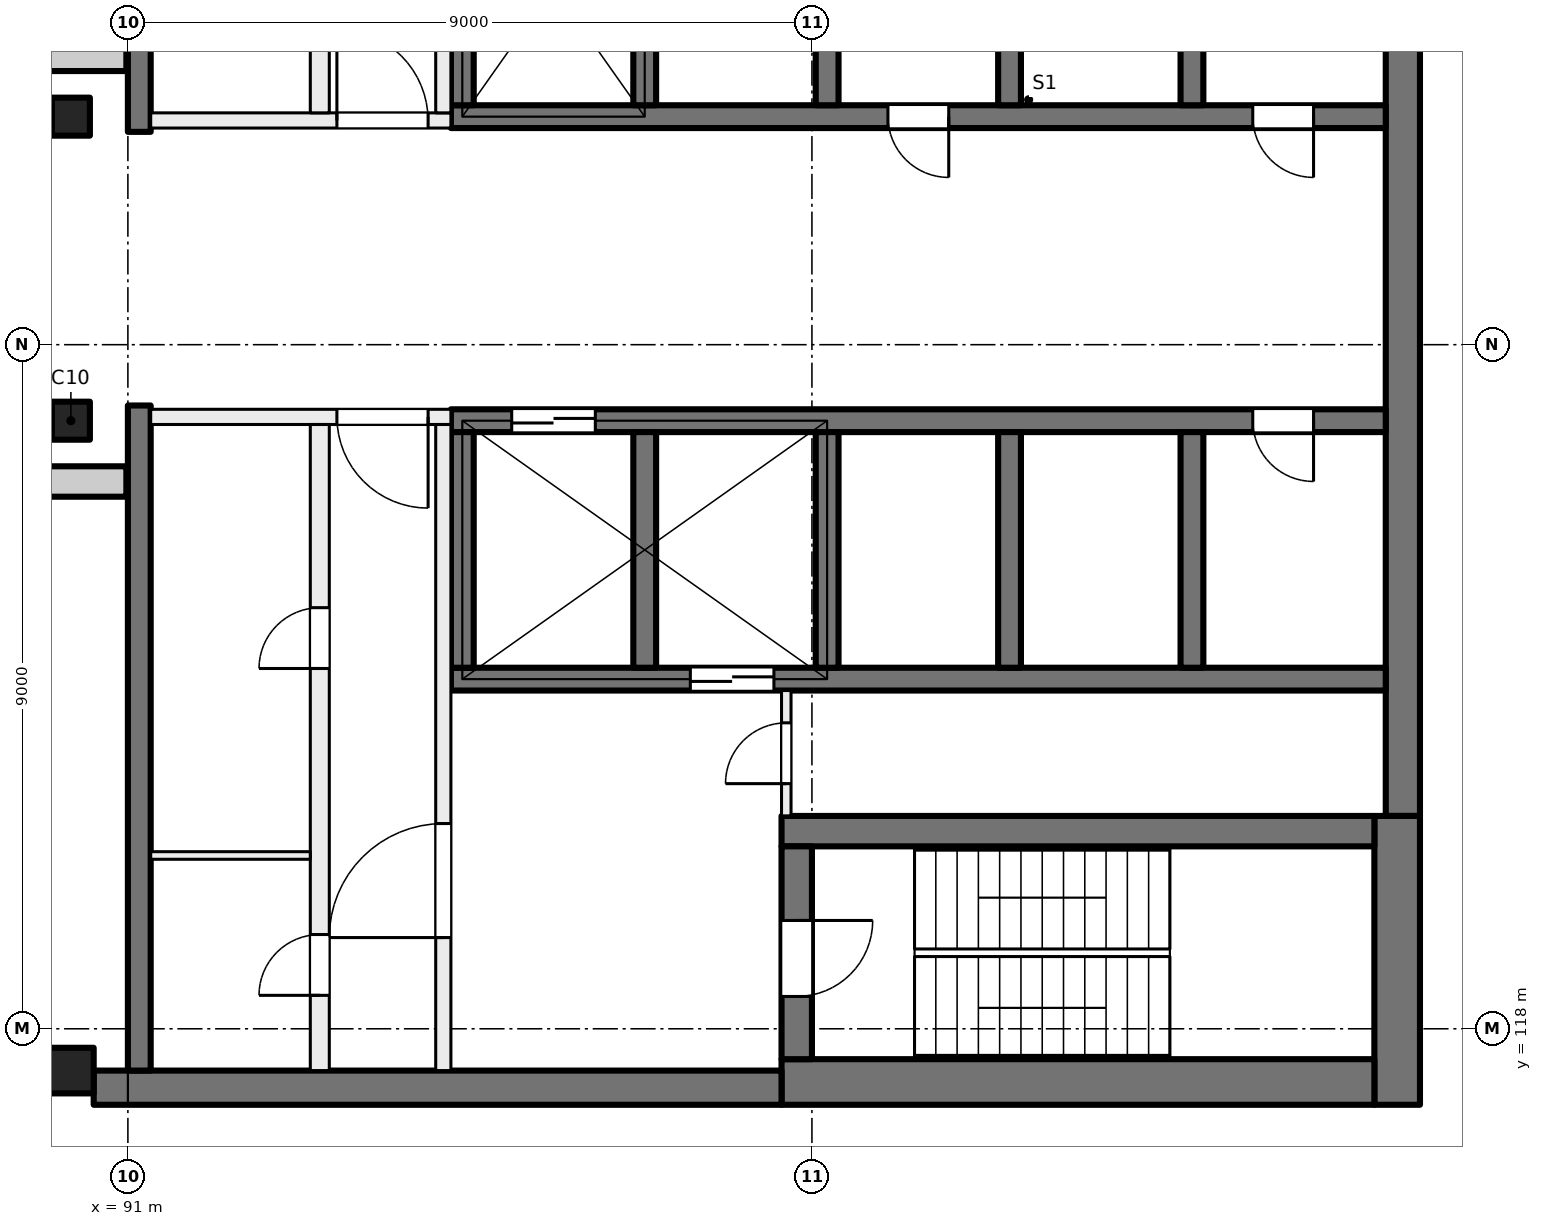
"""IFC4 building model, lengths in metres.
Left out: names, types, materials, properties, quantities, classifications, styles, units other than length and angle.
Written with IfcOpenShell. Run it as: python <this file> out.ifc"""

import sys

from ifc_helpers import new_model, si_unit, direction, frame, frame_2d, origin, origin_2d, place, context, subcontext, project, spatial, rectangle, extrude, element, fill, save


model = new_model("IFC4")
c1 = context("Model", 3, precision=1e-05, world=origin(), true_north=direction((0.0, 1.0)))
c2 = subcontext(c1, "Body", "Model", "MODEL_VIEW")
j1 = project(units=[si_unit("LENGTHUNIT", "METRE"), si_unit("PLANEANGLEUNIT", "RADIAN")], contexts=[c1])
p1 = place(None, origin())
s1 = spatial("IfcSite", under=j1, at=p1, CompositionType="ELEMENT")
p2 = place(p1, origin())
s2 = spatial("IfcBuilding", under=s1, at=p2, CompositionType="ELEMENT")
p3 = place(p2, frame((0.0, 0.0, 286.5)))
s3 = spatial("IfcBuildingStorey", under=s2, at=p3, CompositionType="ELEMENT", Elevation=286.5)
for number, where, z_axis, x_axis in (
    (1, (90.25, 130.0, 0.0), (0.0, 0.0, 1.0), (1.0, 0.0, 0.0)),
    (2, (90.25, 126.0, 0.0), (0.0, 0.0, 1.0), (1.0, 0.0, 0.0)),
):
    element("IfcColumn", number, at=place(p3, frame(where, z_axis=z_axis, x_axis=x_axis)), inside=s3, PredefinedType="COLUMN", context=c2, shape_type="SweptSolid", body=[
        extrude(rectangle(XDim=0.5, YDim=0.5, at=origin_2d()), origin(), (0.0, 0.0, 1.0), 4.5),
    ])
p4 = place(p3, frame((90.25, 117.45, 0.0), z_axis=(0.0, 0.0, 1.0), x_axis=(1.0, 0.0, 0.0)))
e3 = element("IfcColumn", 3, at=p4, inside=s3, PredefinedType="COLUMN", context=c2, shape_type="SweptSolid", body=[
    extrude(rectangle(XDim=0.6, YDim=0.6, at=origin_2d()), origin(), (0.0, 0.0, 1.0), 4.5),
])
p5 = place(p3, frame((107.775, 135.2, 0.0), z_axis=(0.0, 0.0, 1.0), x_axis=(0.0, -1.0, 0.0)))
e4 = element("IfcWall", 4, at=p5, inside=s3, PredefinedType="SHEAR", context=c2, shape_type="SweptSolid", body=[
    extrude(rectangle(XDim=14.4, YDim=0.45, at=frame_2d((7.2, 0.0))), origin(), (0.0, 0.0, 1.0), 4.5),
])
p6 = place(p3, frame((107.7, 120.8, 0.0), z_axis=(0.0, 0.0, 1.0), x_axis=(0.0, -1.0, 0.0)))
e5 = element("IfcWall", 5, at=p6, inside=s3, PredefinedType="SHEAR", context=c2, shape_type="SweptSolid", body=[
    extrude(rectangle(XDim=3.8, YDim=0.6, at=frame_2d((1.9, 0.0))), origin(), (0.0, 0.0, 1.0), 4.5),
])
p7 = place(p3, frame((107.4, 117.3, 0.0), z_axis=(0.0, 0.0, 1.0), x_axis=(-1.0, 0.0, 0.0)))
e6 = element("IfcWall", 6, at=p7, inside=s3, PredefinedType="SHEAR", context=c2, shape_type="SweptSolid", body=[
    extrude(rectangle(XDim=7.8, YDim=0.6, at=frame_2d((3.9, 0.0))), origin(), (0.0, 0.0, 1.0), 4.5),
])
p8 = place(p3, frame((99.6, 117.225, 0.0), z_axis=(0.0, 0.0, 1.0), x_axis=(-1.0, 0.0, 0.0)))
e7 = element("IfcWall", 7, at=p8, inside=s3, PredefinedType="SHEAR", context=c2, shape_type="SweptSolid", body=[
    extrude(rectangle(XDim=9.05, YDim=0.45, at=frame_2d((4.525, 0.0))), origin(), (0.0, 0.0, 1.0), 4.5),
])
p9 = place(p3, frame((107.4, 120.6, 0.0), z_axis=(0.0, 0.0, 1.0), x_axis=(-1.0, 0.0, 0.0)))
e8 = element("IfcWall", 8, at=p9, inside=s3, PredefinedType="SHEAR", context=c2, shape_type="SweptSolid", body=[
    extrude(rectangle(XDim=7.8, YDim=0.4, at=frame_2d((3.9, 0.0))), origin(), (0.0, 0.0, 1.0), 4.5),
])
p10 = place(p3, frame((99.8, 120.4, 0.0), z_axis=(0.0, 0.0, 1.0), x_axis=(0.0, -1.0, 0.0)))
e9 = element("IfcWall", 9, at=p10, inside=s3, PredefinedType="SHEAR", context=c2, shape_type="SweptSolid", body=[
    extrude(rectangle(XDim=2.8, YDim=0.4, at=frame_2d((1.4, 0.0))), origin(), (0.0, 0.0, 1.0), 4.5),
])
p11 = place(p10, frame((0.975, 0.0, 0.0)))
e10 = element("IfcOpeningElement", 10, at=p11, cuts=e9, PredefinedType="OPENING", context=c2, shape_type="SweptSolid", body=[
    extrude(rectangle(XDim=1.0, YDim=2.1, at=frame_2d((0.5, 1.05))), frame((0.0, 0.21, 0.0), z_axis=(0.0, -1.0, 0.0), x_axis=(1.0, 0.0, 0.0)), (0.0, 0.0, 1.0), 0.42),
])
p12 = place(p3, frame((107.55, 130.0, 0.0), z_axis=(0.0, 0.0, 1.0), x_axis=(-1.0, 0.0, 0.0)))
e11 = element("IfcWall", 11, at=p12, inside=s3, PredefinedType="SHEAR", context=c2, shape_type="SweptSolid", body=[
    extrude(rectangle(XDim=12.3, YDim=0.3, at=frame_2d((6.15, 0.0))), origin(), (0.0, 0.0, 1.0), 4.5),
])
p13 = place(p12, frame((0.95, 0.0, 0.0)))
e12 = element("IfcOpeningElement", 12, at=p13, cuts=e11, PredefinedType="OPENING", context=c2, shape_type="SweptSolid", body=[
    extrude(rectangle(XDim=0.8, YDim=2.1, at=frame_2d((0.4, 1.05))), frame((0.0, 0.16, 0.0), z_axis=(0.0, -1.0, 0.0), x_axis=(1.0, 0.0, 0.0)), (0.0, 0.0, 1.0), 0.32),
])
p14 = place(p12, frame((5.75, 0.0, 0.0)))
e13 = element("IfcOpeningElement", 13, at=p14, cuts=e11, PredefinedType="OPENING", context=c2, shape_type="SweptSolid", body=[
    extrude(rectangle(XDim=0.8, YDim=2.1, at=frame_2d((0.4, 1.05))), frame((0.0, 0.16, 0.0), z_axis=(0.0, -1.0, 0.0), x_axis=(1.0, 0.0, 0.0)), (0.0, 0.0, 1.0), 0.32),
])
for number, where, z_axis, x_axis in (
    (14, (105.0, 133.25, 0.0), (0.0, 0.0, 1.0), (0.0, -1.0, 0.0)),
    (15, (102.6, 133.25, 0.0), (0.0, 0.0, 1.0), (0.0, -1.0, 0.0)),
    (16, (100.2, 133.25, 0.0), (0.0, 0.0, 1.0), (0.0, -1.0, 0.0)),
    (17, (97.8, 133.25, 0.0), (0.0, 0.0, 1.0), (0.0, -1.0, 0.0)),
    (18, (95.4, 133.25, 0.0), (0.0, 0.0, 1.0), (0.0, -1.0, 0.0)),
):
    element("IfcWall", number, at=place(p3, frame(where, z_axis=z_axis, x_axis=x_axis)), inside=s3, PredefinedType="SHEAR", context=c2, shape_type="SweptSolid", body=[
        extrude(rectangle(XDim=3.1, YDim=0.3, at=frame_2d((1.55, 0.0))), origin(), (0.0, 0.0, 1.0), 4.5),
    ])
p15 = place(p3, frame((107.55, 126.0, 0.0), z_axis=(0.0, 0.0, 1.0), x_axis=(-1.0, 0.0, 0.0)))
e19 = element("IfcWall", 19, at=p15, inside=s3, PredefinedType="SHEAR", context=c2, shape_type="SweptSolid", body=[
    extrude(rectangle(XDim=12.3, YDim=0.3, at=frame_2d((6.15, 0.0))), origin(), (0.0, 0.0, 1.0), 4.5),
])
p16 = place(p15, frame((10.4, 0.0, 0.0)))
e20 = element("IfcOpeningElement", 20, at=p16, cuts=e19, PredefinedType="OPENING", context=c2, shape_type="SweptSolid", body=[
    extrude(rectangle(XDim=1.1, YDim=2.1, at=frame_2d((0.55, 1.05))), frame((0.0, 0.16, 0.0), z_axis=(0.0, -1.0, 0.0), x_axis=(1.0, 0.0, 0.0)), (0.0, 0.0, 1.0), 0.32),
])
p17 = place(p15, frame((0.95, 0.0, 0.0)))
e21 = element("IfcOpeningElement", 21, at=p17, cuts=e19, PredefinedType="OPENING", context=c2, shape_type="SweptSolid", body=[
    extrude(rectangle(XDim=0.8, YDim=2.1, at=frame_2d((0.4, 1.05))), frame((0.0, 0.16, 0.0), z_axis=(0.0, -1.0, 0.0), x_axis=(1.0, 0.0, 0.0)), (0.0, 0.0, 1.0), 0.32),
])
p18 = place(p3, frame((107.55, 122.6, 0.0), z_axis=(0.0, 0.0, 1.0), x_axis=(-1.0, 0.0, 0.0)))
e22 = element("IfcWall", 22, at=p18, inside=s3, PredefinedType="SHEAR", context=c2, shape_type="SweptSolid", body=[
    extrude(rectangle(XDim=12.3, YDim=0.3, at=frame_2d((6.15, 0.0))), origin(), (0.0, 0.0, 1.0), 4.5),
])
p19 = place(p18, frame((8.05, 0.0, 0.0)))
e23 = element("IfcOpeningElement", 23, at=p19, cuts=e22, PredefinedType="OPENING", context=c2, shape_type="SweptSolid", body=[
    extrude(rectangle(XDim=1.1, YDim=2.1, at=frame_2d((0.55, 1.05))), frame((0.0, 0.16, 0.0), z_axis=(0.0, -1.0, 0.0), x_axis=(1.0, 0.0, 0.0)), (0.0, 0.0, 1.0), 0.32),
])
for number, where, z_axis, x_axis in (
    (24, (105.0, 125.85, 0.0), (0.0, 0.0, 1.0), (0.0, -1.0, 0.0)),
    (25, (102.6, 125.85, 0.0), (0.0, 0.0, 1.0), (0.0, -1.0, 0.0)),
    (26, (100.2, 125.85, 0.0), (0.0, 0.0, 1.0), (0.0, -1.0, 0.0)),
    (27, (97.8, 125.85, 0.0), (0.0, 0.0, 1.0), (0.0, -1.0, 0.0)),
    (28, (95.4, 125.85, 0.0), (0.0, 0.0, 1.0), (0.0, -1.0, 0.0)),
):
    element("IfcWall", number, at=place(p3, frame(where, z_axis=z_axis, x_axis=x_axis)), inside=s3, PredefinedType="SHEAR", context=c2, shape_type="SweptSolid", body=[
        extrude(rectangle(XDim=3.1, YDim=0.3, at=frame_2d((1.55, 0.0))), origin(), (0.0, 0.0, 1.0), 4.5),
    ])
for number, where, z_axis, x_axis in (
    (29, (91.15, 138.55, 0.0), (0.0, 0.0, 1.0), (0.0, -1.0, 0.0)),
    (30, (91.15, 126.2, 0.0), (0.0, 0.0, 1.0), (0.0, -1.0, 0.0)),
):
    element("IfcWall", number, at=place(p3, frame(where, z_axis=z_axis, x_axis=x_axis)), inside=s3, PredefinedType="SHEAR", context=c2, shape_type="SweptSolid", body=[
        extrude(rectangle(XDim=8.75, YDim=0.3, at=frame_2d((4.375, 0.0))), origin(), (0.0, 0.0, 1.0), 4.5),
    ])
p20 = place(p3, frame((90.98, 125.2, 0.0), z_axis=(0.0, 0.0, 1.0), x_axis=(-1.0, 0.0, 0.0)))
e31 = element("IfcWall", 31, at=p20, inside=s3, PredefinedType="SOLIDWALL", context=c2, shape_type="SweptSolid", body=[
    extrude(rectangle(XDim=38.48, YDim=0.4, at=frame_2d((19.24, 0.0))), origin(), (0.0, 0.0, 1.0), 4.125),
])
p21 = place(p3, frame((72.42, 130.8, 0.0), z_axis=(0.0, 0.0, 1.0), x_axis=(1.0, 0.0, 0.0)))
e32 = element("IfcWall", 32, at=p21, inside=s3, PredefinedType="SOLIDWALL", context=c2, shape_type="SweptSolid", body=[
    extrude(rectangle(XDim=18.56, YDim=0.4, at=frame_2d((9.28, 0.0))), origin(), (0.0, 0.0, 1.0), 4.125),
])
p22 = place(p3, frame((95.25, 126.05, 0.0), z_axis=(0.0, 0.0, 1.0), x_axis=(-1.0, 0.0, 0.0)))
e33 = element("IfcWall", 33, at=p22, inside=s3, PredefinedType="PARTITIONING", context=c2, shape_type="SweptSolid", body=[
    extrude(rectangle(XDim=3.95, YDim=0.2, at=frame_2d((1.975, 0.0))), origin(), (0.0, 0.0, 1.0), 4.125),
])
p23 = place(p22, frame((0.3, 0.0, 0.0)))
e34 = element("IfcOpeningElement", 34, at=p23, cuts=e33, PredefinedType="OPENING", context=c2, shape_type="SweptSolid", body=[
    extrude(rectangle(XDim=1.2, YDim=2.1, at=frame_2d((0.6, 1.05))), frame((0.0, 0.11, 0.0), z_axis=(0.0, -1.0, 0.0), x_axis=(1.0, 0.0, 0.0)), (0.0, 0.0, 1.0), 0.22),
])
p24 = place(p3, frame((95.15, 117.45, 0.0), z_axis=(0.0, 0.0, 1.0), x_axis=(0.0, 1.0, 0.0)))
e35 = element("IfcWall", 35, at=p24, inside=s3, PredefinedType="PARTITIONING", context=c2, shape_type="SweptSolid", body=[
    extrude(rectangle(XDim=8.5, YDim=0.2, at=frame_2d((4.25, 0.0))), origin(), (0.0, 0.0, 1.0), 4.125),
])
p25 = place(p24, frame((1.75, 0.0, 0.0)))
e36 = element("IfcOpeningElement", 36, at=p25, cuts=e35, PredefinedType="OPENING", context=c2, shape_type="SweptSolid", body=[
    extrude(rectangle(XDim=1.5, YDim=2.1, at=frame_2d((0.75, 1.05))), frame((0.0, 0.11, 0.0), z_axis=(0.0, -1.0, 0.0), x_axis=(1.0, 0.0, 0.0)), (0.0, 0.0, 1.0), 0.22),
])
p26 = place(p3, frame((93.525, 117.45, 0.0), z_axis=(0.0, 0.0, 1.0), x_axis=(0.0, 1.0, 0.0)))
e37 = element("IfcWall", 37, at=p26, inside=s3, PredefinedType="PARTITIONING", context=c2, shape_type="SweptSolid", body=[
    extrude(rectangle(XDim=8.5, YDim=0.25, at=frame_2d((4.25, 0.0))), origin(), (0.0, 0.0, 1.0), 4.125),
])
p27 = place(p26, frame((5.29, 0.0, 0.0)))
e38 = element("IfcOpeningElement", 38, at=p27, cuts=e37, PredefinedType="OPENING", context=c2, shape_type="SweptSolid", body=[
    extrude(rectangle(XDim=0.8, YDim=2.1, at=frame_2d((0.4, 1.05))), frame((0.0, 0.135, 0.0), z_axis=(0.0, -1.0, 0.0), x_axis=(1.0, 0.0, 0.0)), (0.0, 0.0, 1.0), 0.27),
])
p28 = place(p26, frame((0.99, 0.0, 0.0)))
e39 = element("IfcOpeningElement", 39, at=p28, cuts=e37, PredefinedType="OPENING", context=c2, shape_type="SweptSolid", body=[
    extrude(rectangle(XDim=0.8, YDim=2.1, at=frame_2d((0.4, 1.05))), frame((0.0, 0.135, 0.0), z_axis=(0.0, -1.0, 0.0), x_axis=(1.0, 0.0, 0.0)), (0.0, 0.0, 1.0), 0.27),
])
p29 = place(p3, frame((99.663, 120.8, 0.0), z_axis=(0.0, 0.0, 1.0), x_axis=(0.0, 1.0, 0.0)))
e40 = element("IfcWall", 40, at=p29, inside=s3, PredefinedType="PARTITIONING", context=c2, shape_type="SweptSolid", body=[
    extrude(rectangle(XDim=1.65, YDim=0.125, at=frame_2d((0.825, 0.0))), origin(), (0.0, 0.0, 1.0), 4.125),
])
p30 = place(p29, frame((0.425, 0.0, 0.0)))
e41 = element("IfcOpeningElement", 41, at=p30, cuts=e40, PredefinedType="OPENING", context=c2, shape_type="SweptSolid", body=[
    extrude(rectangle(XDim=0.8, YDim=2.1, at=frame_2d((0.4, 1.05))), frame((0.0, 0.073, 0.0), z_axis=(0.0, -1.0, 0.0), x_axis=(1.0, 0.0, 0.0)), (0.0, 0.0, 1.0), 0.145),
])
p31 = place(p3, frame((93.4, 120.28, 0.0), z_axis=(0.0, 0.0, 1.0), x_axis=(-1.0, 0.0, 0.0)))
e42 = element("IfcWall", 42, at=p31, inside=s3, PredefinedType="PARTITIONING", context=c2, shape_type="SweptSolid", body=[
    extrude(rectangle(XDim=2.1, YDim=0.1, at=frame_2d((1.05, 0.0))), origin(), (0.0, 0.0, 1.0), 4.125),
])
p32 = place(p3, frame((91.3, 129.95, 0.0), z_axis=(0.0, 0.0, 1.0), x_axis=(1.0, 0.0, 0.0)))
e43 = element("IfcWall", 43, at=p32, inside=s3, PredefinedType="PARTITIONING", context=c2, shape_type="SweptSolid", body=[
    extrude(rectangle(XDim=3.95, YDim=0.2, at=frame_2d((1.975, 0.0))), origin(), (0.0, 0.0, 1.0), 4.125),
])
p33 = place(p32, frame((2.45, 0.0, 0.0)))
e44 = element("IfcOpeningElement", 44, at=p33, cuts=e43, PredefinedType="OPENING", context=c2, shape_type="SweptSolid", body=[
    extrude(rectangle(XDim=1.2, YDim=2.1, at=frame_2d((0.6, 1.05))), frame((0.0, 0.11, 0.0), z_axis=(0.0, -1.0, 0.0), x_axis=(1.0, 0.0, 0.0)), (0.0, 0.0, 1.0), 0.22),
])
p34 = place(p3, frame((95.15, 130.05, 0.0), z_axis=(0.0, 0.0, 1.0), x_axis=(0.0, 1.0, 0.0)))
e45 = element("IfcWall", 45, at=p34, inside=s3, PredefinedType="PARTITIONING", context=c2, shape_type="SweptSolid", body=[
    extrude(rectangle(XDim=8.5, YDim=0.2, at=frame_2d((4.25, 0.0))), origin(), (0.0, 0.0, 1.0), 4.125),
])
p35 = place(p34, frame((5.25, 0.0, 0.0)))
e46 = element("IfcOpeningElement", 46, at=p35, cuts=e45, PredefinedType="OPENING", context=c2, shape_type="SweptSolid", body=[
    extrude(rectangle(XDim=1.5, YDim=2.1, at=frame_2d((0.75, 1.05))), frame((0.0, 0.11, 0.0), z_axis=(0.0, -1.0, 0.0), x_axis=(1.0, 0.0, 0.0)), (0.0, 0.0, 1.0), 0.22),
])
p36 = place(p3, frame((93.525, 130.05, 0.0), z_axis=(0.0, 0.0, 1.0), x_axis=(0.0, 1.0, 0.0)))
e47 = element("IfcWall", 47, at=p36, inside=s3, PredefinedType="PARTITIONING", context=c2, shape_type="SweptSolid", body=[
    extrude(rectangle(XDim=8.5, YDim=0.25, at=frame_2d((4.25, 0.0))), origin(), (0.0, 0.0, 1.0), 4.125),
])
p37 = place(p36, frame((3.75, 0.0, 0.0)))
e48 = element("IfcOpeningElement", 48, at=p37, cuts=e47, PredefinedType="OPENING", context=c2, shape_type="SweptSolid", body=[
    extrude(rectangle(XDim=1.0, YDim=2.1, at=frame_2d((0.5, 1.05))), frame((0.0, 0.135, 0.0), z_axis=(0.0, -1.0, 0.0), x_axis=(1.0, 0.0, 0.0)), (0.0, 0.0, 1.0), 0.27),
])
p38 = place(p16, origin())
e49 = element("IfcDoor", 49, at=p38, inside=s3, OperationType="DOUBLE_DOOR_SLIDING", PredefinedType="DOOR", context=c2, shape_type="SweptSolid", body=[
    extrude(rectangle(XDim=1.1, YDim=2.1, at=frame_2d((0.55, 1.05))), frame((0.0, 0.025, 0.0), z_axis=(0.0, -1.0, 0.0), x_axis=(1.0, 0.0, 0.0)), (0.0, 0.0, 1.0), 0.05),
])
fill(e20, e49)
p39 = place(p17, origin())
e50 = element("IfcDoor", 50, at=p39, inside=s3, OperationType="SINGLE_SWING_LEFT", PredefinedType="DOOR", context=c2, shape_type="SweptSolid", body=[
    extrude(rectangle(XDim=0.8, YDim=2.1, at=frame_2d((0.4, 1.05))), frame((0.0, 0.025, 0.0), z_axis=(0.0, -1.0, 0.0), x_axis=(1.0, 0.0, 0.0)), (0.0, 0.0, 1.0), 0.05),
])
fill(e21, e50)
p40 = place(p13, origin())
e51 = element("IfcDoor", 51, at=p40, inside=s3, OperationType="SINGLE_SWING_RIGHT", PredefinedType="DOOR", context=c2, shape_type="SweptSolid", body=[
    extrude(rectangle(XDim=0.8, YDim=2.1, at=frame_2d((0.4, 1.05))), frame((0.0, 0.025, 0.0), z_axis=(0.0, -1.0, 0.0), x_axis=(1.0, 0.0, 0.0)), (0.0, 0.0, 1.0), 0.05),
])
fill(e12, e51)
p41 = place(p14, origin())
e52 = element("IfcDoor", 52, at=p41, inside=s3, OperationType="SINGLE_SWING_LEFT", PredefinedType="DOOR", context=c2, shape_type="SweptSolid", body=[
    extrude(rectangle(XDim=0.8, YDim=2.1, at=frame_2d((0.4, 1.05))), frame((0.0, 0.025, 0.0), z_axis=(0.0, -1.0, 0.0), x_axis=(1.0, 0.0, 0.0)), (0.0, 0.0, 1.0), 0.05),
])
fill(e13, e52)
p42 = place(p23, origin())
e53 = element("IfcDoor", 53, at=p42, inside=s3, OperationType="DOUBLE_DOOR_SINGLE_SWING", PredefinedType="DOOR", context=c2, shape_type="SweptSolid", body=[
    extrude(rectangle(XDim=1.2, YDim=2.1, at=frame_2d((0.6, 1.05))), frame((0.0, 0.025, 0.0), z_axis=(0.0, -1.0, 0.0), x_axis=(1.0, 0.0, 0.0)), (0.0, 0.0, 1.0), 0.05),
])
fill(e34, e53)
p43 = place(p25, origin())
e54 = element("IfcDoor", 54, at=p43, inside=s3, OperationType="DOUBLE_DOOR_SINGLE_SWING", PredefinedType="DOOR", context=c2, shape_type="SweptSolid", body=[
    extrude(rectangle(XDim=1.5, YDim=2.1, at=frame_2d((0.75, 1.05))), frame((0.0, 0.025, 0.0), z_axis=(0.0, -1.0, 0.0), x_axis=(1.0, 0.0, 0.0)), (0.0, 0.0, 1.0), 0.05),
])
fill(e36, e54)
p44 = place(p11, origin())
e55 = element("IfcDoor", 55, at=p44, inside=s3, OperationType="SINGLE_SWING_LEFT", PredefinedType="DOOR", context=c2, shape_type="SweptSolid", body=[
    extrude(rectangle(XDim=1.0, YDim=2.1, at=frame_2d((0.5, 1.05))), frame((0.0, 0.025, 0.0), z_axis=(0.0, -1.0, 0.0), x_axis=(1.0, 0.0, 0.0)), (0.0, 0.0, 1.0), 0.05),
])
fill(e10, e55)
p45 = place(p30, origin())
e56 = element("IfcDoor", 56, at=p45, inside=s3, OperationType="SINGLE_SWING_RIGHT", PredefinedType="DOOR", context=c2, shape_type="SweptSolid", body=[
    extrude(rectangle(XDim=0.8, YDim=2.1, at=frame_2d((0.4, 1.05))), frame((0.0, 0.025, 0.0), z_axis=(0.0, -1.0, 0.0), x_axis=(1.0, 0.0, 0.0)), (0.0, 0.0, 1.0), 0.05),
])
fill(e41, e56)
p46 = place(p27, origin())
e57 = element("IfcDoor", 57, at=p46, inside=s3, OperationType="SINGLE_SWING_LEFT", PredefinedType="DOOR", context=c2, shape_type="SweptSolid", body=[
    extrude(rectangle(XDim=0.8, YDim=2.1, at=frame_2d((0.4, 1.05))), frame((0.0, 0.025, 0.0), z_axis=(0.0, -1.0, 0.0), x_axis=(1.0, 0.0, 0.0)), (0.0, 0.0, 1.0), 0.05),
])
fill(e38, e57)
p47 = place(p28, origin())
e58 = element("IfcDoor", 58, at=p47, inside=s3, OperationType="SINGLE_SWING_RIGHT", PredefinedType="DOOR", context=c2, shape_type="SweptSolid", body=[
    extrude(rectangle(XDim=0.8, YDim=2.1, at=frame_2d((0.4, 1.05))), frame((0.0, 0.025, 0.0), z_axis=(0.0, -1.0, 0.0), x_axis=(1.0, 0.0, 0.0)), (0.0, 0.0, 1.0), 0.05),
])
fill(e39, e58)
p48 = place(p33, origin())
e59 = element("IfcDoor", 59, at=p48, inside=s3, OperationType="DOUBLE_DOOR_SINGLE_SWING", PredefinedType="DOOR", context=c2, shape_type="SweptSolid", body=[
    extrude(rectangle(XDim=1.2, YDim=2.1, at=frame_2d((0.6, 1.05))), frame((0.0, 0.025, 0.0), z_axis=(0.0, -1.0, 0.0), x_axis=(1.0, 0.0, 0.0)), (0.0, 0.0, 1.0), 0.05),
])
fill(e44, e59)
p49 = place(p19, origin())
e60 = element("IfcDoor", 60, at=p49, inside=s3, OperationType="DOUBLE_DOOR_SLIDING", PredefinedType="DOOR", context=c2, shape_type="SweptSolid", body=[
    extrude(rectangle(XDim=1.1, YDim=2.1, at=frame_2d((0.55, 1.05))), frame((0.0, 0.025, 0.0), z_axis=(0.0, -1.0, 0.0), x_axis=(1.0, 0.0, 0.0)), (0.0, 0.0, 1.0), 0.05),
])
fill(e23, e60)
save(model, sys.argv[1])
